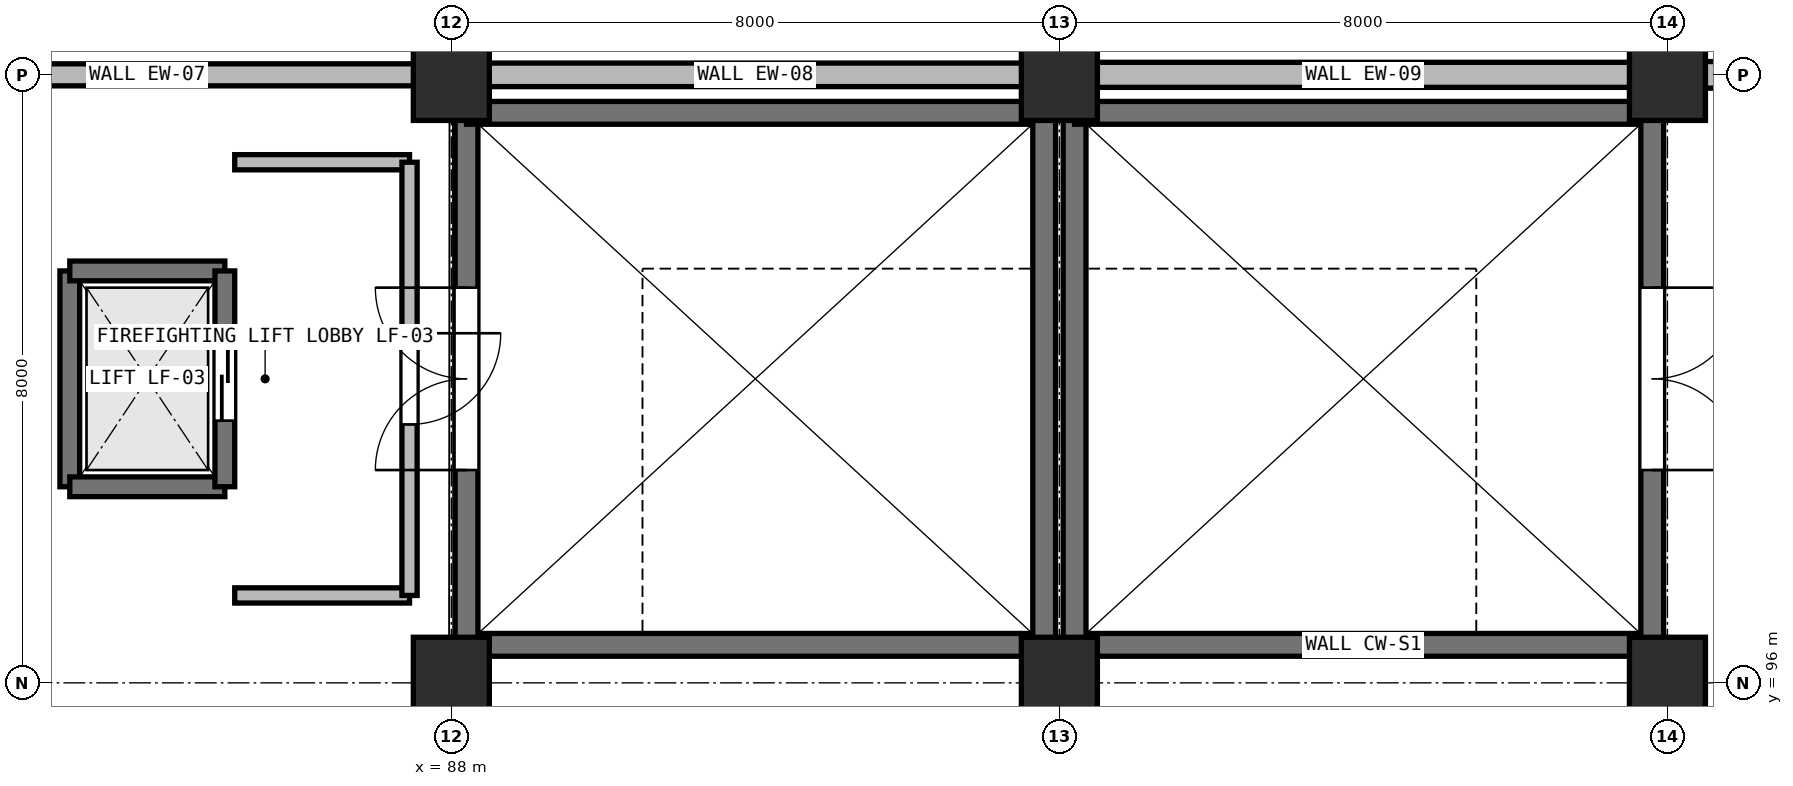
"""IFC4 building model, lengths in metres.
Left out: names, types, materials, properties, quantities, classifications, styles, units other than length and angle.
Written with IfcOpenShell. Run it as: python <this file> out.ifc"""

import sys

from ifc_helpers import new_model, si_unit, direction, frame, frame_2d, origin, origin_2d, place, context, subcontext, project, spatial, rectangle, extrude, element, fill, save


model = new_model("IFC4")
c1 = context("Model", 3, precision=1e-05, world=origin(), true_north=direction((0.0, 1.0)))
c2 = subcontext(c1, "Body", "Model", "MODEL_VIEW")
j1 = project(units=[si_unit("LENGTHUNIT", "METRE"), si_unit("PLANEANGLEUNIT", "RADIAN")], contexts=[c1])
p1 = place(None, origin())
s1 = spatial("IfcSite", under=j1, at=p1, CompositionType="ELEMENT")
p2 = place(p1, origin())
s2 = spatial("IfcBuilding", under=s1, at=p2, CompositionType="ELEMENT")
p3 = place(p2, frame((0.0, 0.0, 24.6)))
s3 = spatial("IfcBuildingStorey", under=s2, at=p3, CompositionType="ELEMENT", Elevation=24.6)
for number, where, z_axis, x_axis in (
    (1, (88.0, 96.0, 0.0), (0.0, 0.0, 1.0), (1.0, 0.0, 0.0)),
    (2, (88.0, 104.0, 0.0), (0.0, 0.0, 1.0), (1.0, 0.0, 0.0)),
    (3, (96.0, 96.0, 0.0), (0.0, 0.0, 1.0), (1.0, 0.0, 0.0)),
    (4, (96.0, 104.0, 0.0), (0.0, 0.0, 1.0), (1.0, 0.0, 0.0)),
    (5, (104.0, 96.0, 0.0), (0.0, 0.0, 1.0), (1.0, 0.0, 0.0)),
    (6, (104.0, 104.0, 0.0), (0.0, 0.0, 1.0), (1.0, 0.0, 0.0)),
):
    element("IfcColumn", number, at=place(p3, frame(where, z_axis=z_axis, x_axis=x_axis)), inside=s3, PredefinedType="COLUMN", context=c2, shape_type="SweptSolid", body=[
        extrude(rectangle(XDim=1.0, YDim=1.2, at=origin_2d()), origin(), (0.0, 0.0, 1.0), 4.8),
    ])
p4 = place(p3, frame((80.48, 104.0, 0.0), z_axis=(0.0, 0.0, 1.0), x_axis=(1.0, 0.0, 0.0)))
e7 = element("IfcWall", 7, at=p4, inside=s3, PredefinedType="SOLIDWALL", context=c2, shape_type="SweptSolid", body=[
    extrude(rectangle(XDim=7.04, YDim=0.29, at=frame_2d((3.52, 0.0))), origin(), (0.0, 0.0, 1.0), 3.71),
])
p5 = place(p3, frame((88.48, 104.0, 0.0), z_axis=(0.0, 0.0, 1.0), x_axis=(1.0, 0.0, 0.0)))
e8 = element("IfcWall", 8, at=p5, inside=s3, PredefinedType="SOLIDWALL", context=c2, shape_type="SweptSolid", body=[
    extrude(rectangle(XDim=7.04, YDim=0.31, at=frame_2d((3.52, 0.0))), origin(), (0.0, 0.0, 1.0), 3.71),
])
p6 = place(p3, frame((96.48, 104.0, 0.0), z_axis=(0.0, 0.0, 1.0), x_axis=(1.0, 0.0, 0.0)))
e9 = element("IfcWall", 9, at=p6, inside=s3, PredefinedType="SOLIDWALL", context=c2, shape_type="SweptSolid", body=[
    extrude(rectangle(XDim=7.04, YDim=0.33, at=frame_2d((3.52, 0.0))), origin(), (0.0, 0.0, 1.0), 3.71),
])
p7 = place(p3, frame((104.48, 104.0, 0.0), z_axis=(0.0, 0.0, 1.0), x_axis=(1.0, 0.0, 0.0)))
e10 = element("IfcWall", 10, at=p7, inside=s3, PredefinedType="SOLIDWALL", context=c2, shape_type="SweptSolid", body=[
    extrude(rectangle(XDim=7.04, YDim=0.35, at=frame_2d((3.52, 0.0))), origin(), (0.0, 0.0, 1.0), 3.71),
])
p8 = place(p3, frame((103.8, 96.5, 0.0), z_axis=(0.0, 0.0, 1.0), x_axis=(-1.0, 0.0, 0.0)))
e11 = element("IfcWall", 11, at=p8, inside=s3, PredefinedType="SHEAR", context=c2, shape_type="SweptSolid", body=[
    extrude(rectangle(XDim=7.6, YDim=0.3, at=frame_2d((3.8, 0.0))), origin(), (0.0, 0.0, 1.0), 4.55),
])
p9 = place(p3, frame((96.2, 96.5, 0.0), z_axis=(0.0, 0.0, 1.0), x_axis=(0.0, 1.0, 0.0)))
e12 = element("IfcWall", 12, at=p9, inside=s3, PredefinedType="SHEAR", context=c2, shape_type="SweptSolid", body=[
    extrude(rectangle(XDim=7.0, YDim=0.3, at=frame_2d((3.5, 0.0))), origin(), (0.0, 0.0, 1.0), 4.55),
])
p10 = place(p3, frame((96.2, 103.5, 0.0), z_axis=(0.0, 0.0, 1.0), x_axis=(1.0, 0.0, 0.0)))
e13 = element("IfcWall", 13, at=p10, inside=s3, PredefinedType="SHEAR", context=c2, shape_type="SweptSolid", body=[
    extrude(rectangle(XDim=7.6, YDim=0.3, at=frame_2d((3.8, 0.0))), origin(), (0.0, 0.0, 1.0), 4.55),
])
p11 = place(p3, frame((103.8, 103.5, 0.0), z_axis=(0.0, 0.0, 1.0), x_axis=(0.0, -1.0, 0.0)))
e14 = element("IfcWall", 14, at=p11, inside=s3, PredefinedType="SHEAR", context=c2, shape_type="SweptSolid", body=[
    extrude(rectangle(XDim=7.0, YDim=0.3, at=frame_2d((3.5, 0.0))), origin(), (0.0, 0.0, 1.0), 4.55),
])
p12 = place(p11, frame((2.3, 0.0, 0.0)))
e15 = element("IfcOpeningElement", 15, at=p12, cuts=e14, PredefinedType="OPENING", context=c2, shape_type="SweptSolid", body=[
    extrude(rectangle(XDim=2.4, YDim=2.2, at=frame_2d((1.2, 1.1))), frame((0.0, 0.16, 0.0), z_axis=(0.0, -1.0, 0.0), x_axis=(1.0, 0.0, 0.0)), (0.0, 0.0, 1.0), 0.32),
])
p13 = place(p3, frame((95.8, 96.5, 0.0), z_axis=(0.0, 0.0, 1.0), x_axis=(-1.0, 0.0, 0.0)))
e16 = element("IfcWall", 16, at=p13, inside=s3, PredefinedType="SHEAR", context=c2, shape_type="SweptSolid", body=[
    extrude(rectangle(XDim=7.6, YDim=0.3, at=frame_2d((3.8, 0.0))), origin(), (0.0, 0.0, 1.0), 4.55),
])
p14 = place(p3, frame((88.2, 96.5, 0.0), z_axis=(0.0, 0.0, 1.0), x_axis=(0.0, 1.0, 0.0)))
e17 = element("IfcWall", 17, at=p14, inside=s3, PredefinedType="SHEAR", context=c2, shape_type="SweptSolid", body=[
    extrude(rectangle(XDim=7.0, YDim=0.3, at=frame_2d((3.5, 0.0))), origin(), (0.0, 0.0, 1.0), 4.55),
])
p15 = place(p14, frame((2.3, 0.0, 0.0)))
e18 = element("IfcOpeningElement", 18, at=p15, cuts=e17, PredefinedType="OPENING", context=c2, shape_type="SweptSolid", body=[
    extrude(rectangle(XDim=2.4, YDim=2.2, at=frame_2d((1.2, 1.1))), frame((0.0, 0.16, 0.0), z_axis=(0.0, -1.0, 0.0), x_axis=(1.0, 0.0, 0.0)), (0.0, 0.0, 1.0), 0.32),
])
p16 = place(p3, frame((88.2, 103.5, 0.0), z_axis=(0.0, 0.0, 1.0), x_axis=(1.0, 0.0, 0.0)))
e19 = element("IfcWall", 19, at=p16, inside=s3, PredefinedType="SHEAR", context=c2, shape_type="SweptSolid", body=[
    extrude(rectangle(XDim=7.6, YDim=0.3, at=frame_2d((3.8, 0.0))), origin(), (0.0, 0.0, 1.0), 4.55),
])
p17 = place(p3, frame((95.8, 103.5, 0.0), z_axis=(0.0, 0.0, 1.0), x_axis=(0.0, -1.0, 0.0)))
e20 = element("IfcWall", 20, at=p17, inside=s3, PredefinedType="SHEAR", context=c2, shape_type="SweptSolid", body=[
    extrude(rectangle(XDim=7.0, YDim=0.3, at=frame_2d((3.5, 0.0))), origin(), (0.0, 0.0, 1.0), 4.55),
])
p18 = place(p3, frame((82.98, 98.58, 0.0), z_axis=(0.0, 0.0, 1.0), x_axis=(0.0, 1.0, 0.0)))
e21 = element("IfcWall", 21, at=p18, inside=s3, PredefinedType="SHEAR", context=c2, shape_type="SweptSolid", body=[
    extrude(rectangle(XDim=2.84, YDim=0.26, at=frame_2d((1.42, 0.0))), origin(), (0.0, 0.0, 1.0), 4.55),
])
for number, where, z_axis, x_axis in (
    (22, (82.98, 101.42, 0.0), (0.0, 0.0, 1.0), (1.0, 0.0, 0.0)),
    (23, (85.02, 98.58, 0.0), (0.0, 0.0, 1.0), (-1.0, 0.0, 0.0)),
):
    element("IfcWall", number, at=place(p3, frame(where, z_axis=z_axis, x_axis=x_axis)), inside=s3, PredefinedType="SHEAR", context=c2, shape_type="SweptSolid", body=[
        extrude(rectangle(XDim=2.04, YDim=0.26, at=frame_2d((1.02, 0.0))), origin(), (0.0, 0.0, 1.0), 4.55),
    ])
p19 = place(p3, frame((85.02, 101.42, 0.0), z_axis=(0.0, 0.0, 1.0), x_axis=(0.0, -1.0, 0.0)))
e24 = element("IfcWall", 24, at=p19, inside=s3, PredefinedType="SHEAR", context=c2, shape_type="SweptSolid", body=[
    extrude(rectangle(XDim=2.84, YDim=0.26, at=frame_2d((1.42, 0.0))), origin(), (0.0, 0.0, 1.0), 4.55),
])
p20 = place(p19, frame((0.87, 0.0, 0.0)))
e25 = element("IfcOpeningElement", 25, at=p20, cuts=e24, PredefinedType="OPENING", context=c2, shape_type="SweptSolid", body=[
    extrude(rectangle(XDim=1.1, YDim=2.15, at=frame_2d((0.55, 1.075))), frame((0.0, 0.14, 0.0), z_axis=(0.0, -1.0, 0.0), x_axis=(1.0, 0.0, 0.0)), (0.0, 0.0, 1.0), 0.28),
])
for number, where, z_axis, x_axis in (
    (26, (85.15, 102.85, 0.0), (0.0, 0.0, 1.0), (1.0, 0.0, 0.0)),
    (27, (87.45, 97.15, 0.0), (0.0, 0.0, 1.0), (-1.0, 0.0, 0.0)),
):
    element("IfcWall", number, at=place(p3, frame(where, z_axis=z_axis, x_axis=x_axis)), inside=s3, PredefinedType="PARTITIONING", context=c2, shape_type="SweptSolid", body=[
        extrude(rectangle(XDim=2.3, YDim=0.2, at=frame_2d((1.15, 0.0))), origin(), (0.0, 0.0, 1.0), 4.55),
    ])
p21 = place(p3, frame((87.45, 102.85, 0.0), z_axis=(0.0, 0.0, 1.0), x_axis=(0.0, -1.0, 0.0)))
e28 = element("IfcWall", 28, at=p21, inside=s3, PredefinedType="PARTITIONING", context=c2, shape_type="SweptSolid", body=[
    extrude(rectangle(XDim=5.7, YDim=0.2, at=frame_2d((2.85, 0.0))), origin(), (0.0, 0.0, 1.0), 3.71),
])
p22 = place(p21, frame((2.25, 0.0, 0.0)))
e29 = element("IfcOpeningElement", 29, at=p22, cuts=e28, PredefinedType="OPENING", context=c2, shape_type="SweptSolid", body=[
    extrude(rectangle(XDim=1.2, YDim=2.2, at=frame_2d((0.6, 1.1))), frame((0.0, 0.11, 0.0), z_axis=(0.0, -1.0, 0.0), x_axis=(1.0, 0.0, 0.0)), (0.0, 0.0, 1.0), 0.22),
])
p23 = place(p12, frame((2.4, 0.0, 0.0), z_axis=(0.0, 0.0, 1.0), x_axis=(-1.0, 0.0, 0.0)))
e30 = element("IfcDoor", 30, at=p23, inside=s3, OperationType="DOUBLE_DOOR_SINGLE_SWING", PredefinedType="DOOR", context=c2, shape_type="SweptSolid", body=[
    extrude(rectangle(XDim=2.4, YDim=2.2, at=frame_2d((1.2, 1.1))), frame((0.0, 0.025, 0.0), z_axis=(0.0, -1.0, 0.0), x_axis=(1.0, 0.0, 0.0)), (0.0, 0.0, 1.0), 0.05),
])
fill(e15, e30)
p24 = place(p15, frame((2.4, 0.0, 0.0), z_axis=(0.0, 0.0, 1.0), x_axis=(-1.0, 0.0, 0.0)))
e31 = element("IfcDoor", 31, at=p24, inside=s3, OperationType="DOUBLE_DOOR_SINGLE_SWING", PredefinedType="DOOR", context=c2, shape_type="SweptSolid", body=[
    extrude(rectangle(XDim=2.4, YDim=2.2, at=frame_2d((1.2, 1.1))), frame((0.0, 0.025, 0.0), z_axis=(0.0, -1.0, 0.0), x_axis=(1.0, 0.0, 0.0)), (0.0, 0.0, 1.0), 0.05),
])
fill(e18, e31)
p25 = place(p20, origin())
e32 = element("IfcDoor", 32, at=p25, inside=s3, OperationType="SLIDING_TO_LEFT", PredefinedType="DOOR", context=c2, shape_type="SweptSolid", body=[
    extrude(rectangle(XDim=1.1, YDim=2.15, at=frame_2d((0.55, 1.075))), frame((0.0, 0.025, 0.0), z_axis=(0.0, -1.0, 0.0), x_axis=(1.0, 0.0, 0.0)), (0.0, 0.0, 1.0), 0.05),
])
fill(e25, e32)
p26 = place(p22, origin())
e33 = element("IfcDoor", 33, at=p26, inside=s3, OperationType="SINGLE_SWING_LEFT", PredefinedType="DOOR", context=c2, shape_type="SweptSolid", body=[
    extrude(rectangle(XDim=1.2, YDim=2.2, at=frame_2d((0.6, 1.1))), frame((0.0, 0.025, 0.0), z_axis=(0.0, -1.0, 0.0), x_axis=(1.0, 0.0, 0.0)), (0.0, 0.0, 1.0), 0.05),
])
fill(e29, e33)
save(model, sys.argv[1])
